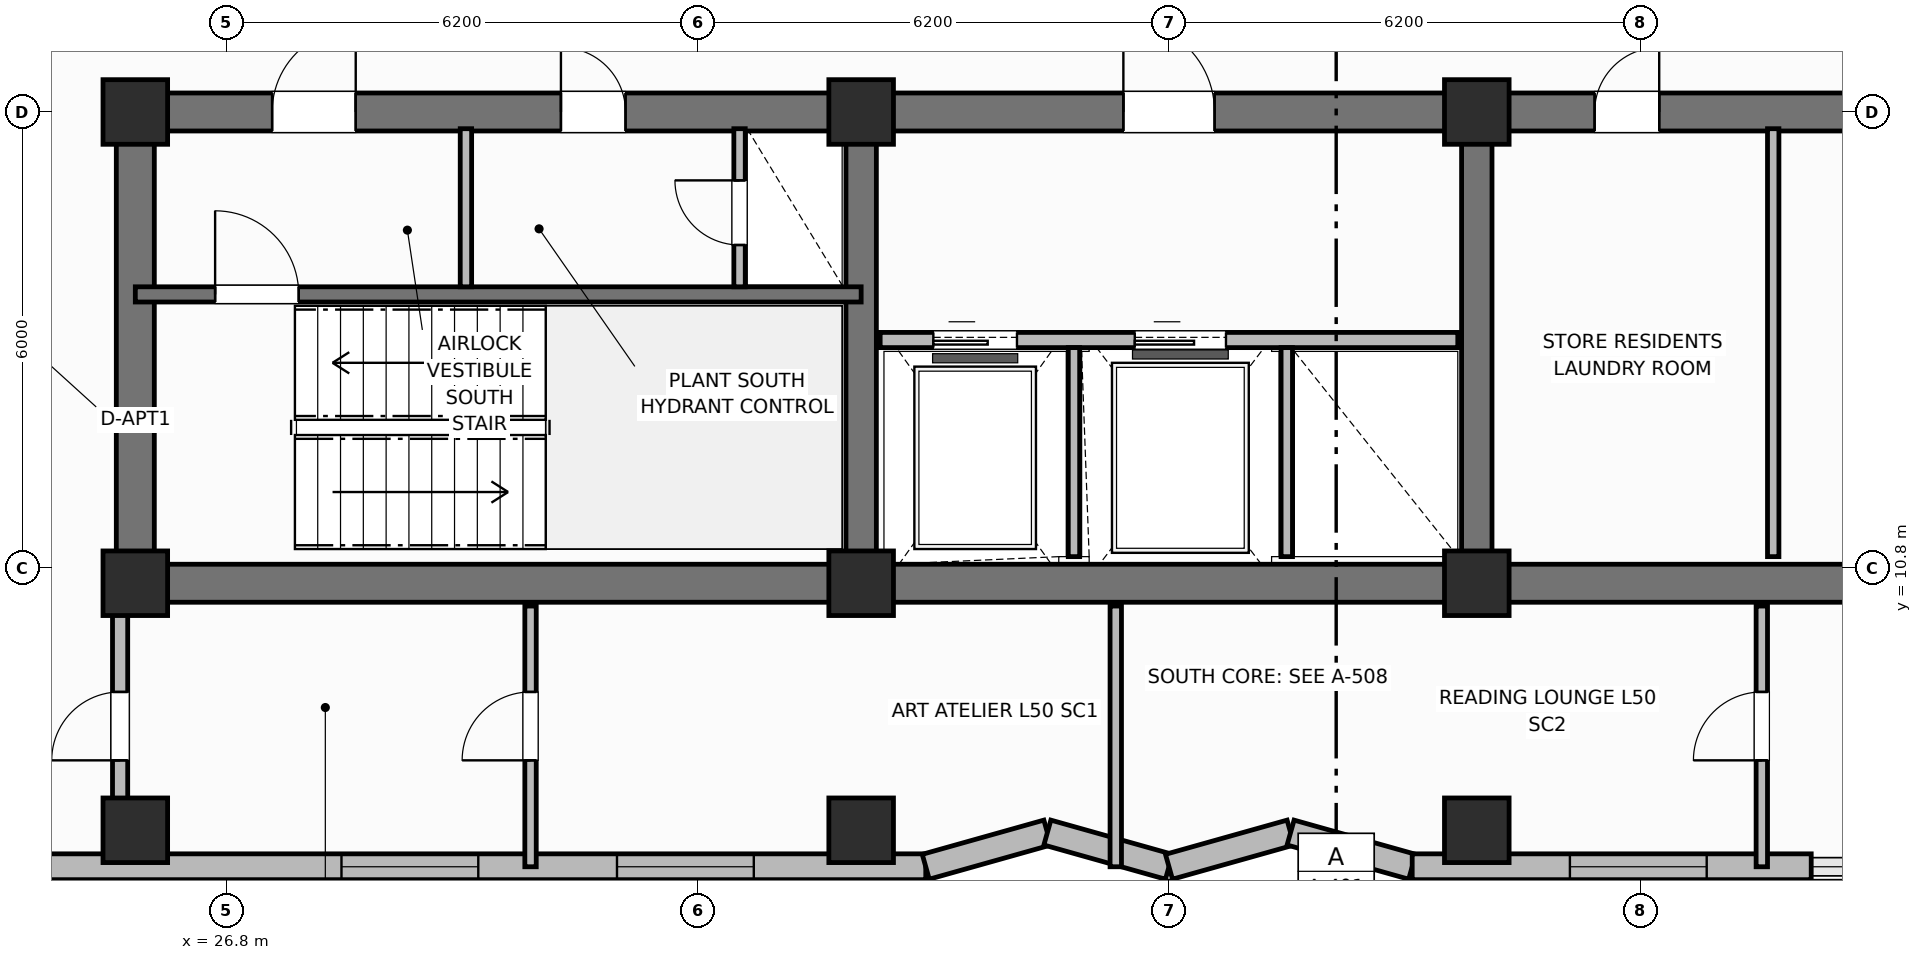
"""IFC4 building model, lengths in metres.
Left out: names, types, materials, properties, quantities, classifications, styles, units other than length and angle.
Written with IfcOpenShell. Run it as: python <this file> out.ifc"""

import sys

from ifc_helpers import new_model, si_unit, direction, frame, frame_2d, origin, origin_2d, place, context, subcontext, project, spatial, rectangle, extrude, element, fill, save


model = new_model("IFC4")
c1 = context("Model", 3, precision=1e-05, world=origin(), true_north=direction((0.0, 1.0)))
c2 = subcontext(c1, "Body", "Model", "MODEL_VIEW")
j1 = project(units=[si_unit("LENGTHUNIT", "METRE"), si_unit("PLANEANGLEUNIT", "RADIAN")], contexts=[c1])
p1 = place(None, origin())
s1 = spatial("IfcSite", under=j1, at=p1, CompositionType="ELEMENT")
p2 = place(p1, origin())
s2 = spatial("IfcBuilding", under=s1, at=p2, CompositionType="ELEMENT")
p3 = place(p2, frame((0.0, 0.0, 203.1)))
s3 = spatial("IfcBuildingStorey", under=s2, at=p3, CompositionType="ELEMENT", Elevation=203.1)
p4 = place(p3, frame((52.8, 10.6, 0.0), z_axis=(0.0, 0.0, 1.0), x_axis=(-1.0, 0.0, 0.0)))
e1 = element("IfcWall", 1, at=p4, inside=s3, PredefinedType="SHEAR", context=c2, shape_type="SweptSolid", body=[
    extrude(rectangle(XDim=27.2, YDim=0.5, at=frame_2d((13.6, 0.0))), origin(), (0.0, 0.0, 1.0), 4.2),
])
p5 = place(p3, frame((25.6, 10.85, 0.0), z_axis=(0.0, 0.0, 1.0), x_axis=(0.0, 1.0, 0.0)))
e2 = element("IfcWall", 2, at=p5, inside=s3, PredefinedType="SHEAR", context=c2, shape_type="SweptSolid", body=[
    extrude(rectangle(XDim=5.7, YDim=0.5, at=frame_2d((2.85, 0.0))), origin(), (0.0, 0.0, 1.0), 4.2),
])
p6 = place(p3, frame((25.6, 16.8, 0.0), z_axis=(0.0, 0.0, 1.0), x_axis=(1.0, 0.0, 0.0)))
e3 = element("IfcWall", 3, at=p6, inside=s3, PredefinedType="SHEAR", context=c2, shape_type="SweptSolid", body=[
    extrude(rectangle(XDim=27.2, YDim=0.5, at=frame_2d((13.6, 0.0))), origin(), (0.0, 0.0, 1.0), 4.2),
])
p7 = place(p6, frame((1.8, 0.0, 0.0)))
e4 = element("IfcOpeningElement", 4, at=p7, cuts=e3, PredefinedType="OPENING", context=c2, shape_type="SweptSolid", body=[
    extrude(rectangle(XDim=1.1, YDim=2.15, at=frame_2d((0.55, 1.075))), frame((0.0, 0.26, 0.0), z_axis=(0.0, -1.0, 0.0), x_axis=(1.0, 0.0, 0.0)), (0.0, 0.0, 1.0), 0.52),
])
p8 = place(p6, frame((5.6, 0.0, 0.0)))
e5 = element("IfcOpeningElement", 5, at=p8, cuts=e3, PredefinedType="OPENING", context=c2, shape_type="SweptSolid", body=[
    extrude(rectangle(XDim=0.85, YDim=2.1, at=frame_2d((0.425, 1.05))), frame((0.0, 0.26, 0.0), z_axis=(0.0, -1.0, 0.0), x_axis=(1.0, 0.0, 0.0)), (0.0, 0.0, 1.0), 0.52),
])
p9 = place(p6, frame((13.0, 0.0, 0.0)))
e6 = element("IfcOpeningElement", 6, at=p9, cuts=e3, PredefinedType="OPENING", context=c2, shape_type="SweptSolid", body=[
    extrude(rectangle(XDim=1.2, YDim=2.15, at=frame_2d((0.6, 1.075))), frame((0.0, 0.26, 0.0), z_axis=(0.0, -1.0, 0.0), x_axis=(1.0, 0.0, 0.0)), (0.0, 0.0, 1.0), 0.52),
])
p10 = place(p6, frame((19.2, 0.0, 0.0)))
e7 = element("IfcOpeningElement", 7, at=p10, cuts=e3, PredefinedType="OPENING", context=c2, shape_type="SweptSolid", body=[
    extrude(rectangle(XDim=0.85, YDim=2.1, at=frame_2d((0.425, 1.05))), frame((0.0, 0.26, 0.0), z_axis=(0.0, -1.0, 0.0), x_axis=(1.0, 0.0, 0.0)), (0.0, 0.0, 1.0), 0.52),
])
p11 = place(p6, frame((23.8, 0.0, 0.0)))
e8 = element("IfcOpeningElement", 8, at=p11, cuts=e3, PredefinedType="OPENING", context=c2, shape_type="SweptSolid", body=[
    extrude(rectangle(XDim=0.9, YDim=2.1, at=frame_2d((0.45, 1.05))), frame((0.0, 0.26, 0.0), z_axis=(0.0, -1.0, 0.0), x_axis=(1.0, 0.0, 0.0)), (0.0, 0.0, 1.0), 0.52),
])
for number, where, z_axis, x_axis in (
    (9, (35.15, 10.85, 0.0), (0.0, 0.0, 1.0), (0.0, 1.0, 0.0)),
    (10, (43.25, 10.85, 0.0), (0.0, 0.0, 1.0), (0.0, 1.0, 0.0)),
):
    element("IfcWall", number, at=place(p3, frame(where, z_axis=z_axis, x_axis=x_axis)), inside=s3, PredefinedType="SHEAR", context=c2, shape_type="SweptSolid", body=[
        extrude(rectangle(XDim=5.7, YDim=0.4, at=frame_2d((2.85, 0.0))), origin(), (0.0, 0.0, 1.0), 4.2),
    ])
for number, where, z_axis, x_axis in (
    (11, (25.6, 10.6, 0.0), (0.0, 0.0, 1.0), (1.0, 0.0, 0.0)),
    (12, (25.6, 16.8, 0.0), (0.0, 0.0, 1.0), (1.0, 0.0, 0.0)),
    (13, (35.15, 10.6, 0.0), (0.0, 0.0, 1.0), (1.0, 0.0, 0.0)),
    (14, (35.15, 16.8, 0.0), (0.0, 0.0, 1.0), (1.0, 0.0, 0.0)),
    (15, (43.25, 10.6, 0.0), (0.0, 0.0, 1.0), (1.0, 0.0, 0.0)),
    (16, (43.25, 16.8, 0.0), (0.0, 0.0, 1.0), (1.0, 0.0, 0.0)),
    (17, (25.6, 7.35, 0.0), (0.0, 0.0, 1.0), (1.0, 0.0, 0.0)),
    (18, (35.15, 7.35, 0.0), (0.0, 0.0, 1.0), (1.0, 0.0, 0.0)),
    (19, (43.25, 7.35, 0.0), (0.0, 0.0, 1.0), (1.0, 0.0, 0.0)),
):
    element("IfcColumn", number, at=place(p3, frame(where, z_axis=z_axis, x_axis=x_axis)), inside=s3, PredefinedType="COLUMN", context=c2, shape_type="SweptSolid", body=[
        extrude(rectangle(XDim=0.85, YDim=0.85, at=origin_2d()), origin(), (0.0, 0.0, 1.0), 4.2),
    ])
p12 = place(p3, frame((20.2, 6.87, 0.0), z_axis=(0.0, 0.0, 1.0), x_axis=(1.0, 0.0, 0.0)))
e20 = element("IfcWall", 20, at=p12, inside=s3, PredefinedType="SOLIDWALL", context=c2, shape_type="SweptSolid", body=[
    extrude(rectangle(XDim=15.8, YDim=0.34, at=frame_2d((7.9, 0.0))), origin(), (0.0, 0.0, 1.0), 3.22),
])
p13 = place(p12, frame((1.212, 0.0, 0.85)))
e21 = element("IfcOpeningElement", 21, at=p13, cuts=e20, PredefinedType="OPENING", context=c2, shape_type="SweptSolid", body=[
    extrude(rectangle(XDim=1.8, YDim=1.85, at=frame_2d((0.9, 0.925))), frame((0.0, 0.18, 0.0), z_axis=(0.0, -1.0, 0.0), x_axis=(1.0, 0.0, 0.0)), (0.0, 0.0, 1.0), 0.36),
])
p14 = place(p12, frame((8.113, 0.0, 0.85)))
e22 = element("IfcOpeningElement", 22, at=p14, cuts=e20, PredefinedType="OPENING", context=c2, shape_type="SweptSolid", body=[
    extrude(rectangle(XDim=1.8, YDim=1.85, at=frame_2d((0.9, 0.925))), frame((0.0, 0.18, 0.0), z_axis=(0.0, -1.0, 0.0), x_axis=(1.0, 0.0, 0.0)), (0.0, 0.0, 1.0), 0.36),
])
p15 = place(p12, frame((11.738, 0.0, 0.85)))
e23 = element("IfcOpeningElement", 23, at=p15, cuts=e20, PredefinedType="OPENING", context=c2, shape_type="SweptSolid", body=[
    extrude(rectangle(XDim=1.8, YDim=1.85, at=frame_2d((0.9, 0.925))), frame((0.0, 0.18, 0.0), z_axis=(0.0, -1.0, 0.0), x_axis=(1.0, 0.0, 0.0)), (0.0, 0.0, 1.0), 0.36),
])
p16 = place(p3, frame((36.0, 6.87, 0.0), z_axis=(0.0, 0.0, 1.0), x_axis=(0.962662902433, 0.270703040766, 0.0)))
e24 = element("IfcWall", 24, at=p16, inside=s3, PredefinedType="SOLIDWALL", context=c2, shape_type="SweptSolid", body=[
    extrude(rectangle(XDim=1.662, YDim=0.34, at=frame_2d((0.831, 0.0))), origin(), (0.0, 0.0, 1.0), 3.22),
])
p17 = place(p3, frame((37.6, 7.32, 0.0), z_axis=(0.0, 0.0, 1.0), x_axis=(0.962652136636, -0.270741322725, 0.0)))
e25 = element("IfcWall", 25, at=p17, inside=s3, PredefinedType="SOLIDWALL", context=c2, shape_type="SweptSolid", body=[
    extrude(rectangle(XDim=1.662, YDim=0.34, at=frame_2d((0.831, 0.0))), origin(), (0.0, 0.0, 1.0), 3.22),
])
p18 = place(p3, frame((39.2, 6.87, 0.0), z_axis=(0.0, 0.0, 1.0), x_axis=(0.962662902433, 0.270703040766, 0.0)))
e26 = element("IfcWall", 26, at=p18, inside=s3, PredefinedType="SOLIDWALL", context=c2, shape_type="SweptSolid", body=[
    extrude(rectangle(XDim=1.662, YDim=0.34, at=frame_2d((0.831, 0.0))), origin(), (0.0, 0.0, 1.0), 3.22),
])
p19 = place(p3, frame((40.8, 7.32, 0.0), z_axis=(0.0, 0.0, 1.0), x_axis=(0.962652136636, -0.270741322725, 0.0)))
e27 = element("IfcWall", 27, at=p19, inside=s3, PredefinedType="SOLIDWALL", context=c2, shape_type="SweptSolid", body=[
    extrude(rectangle(XDim=1.662, YDim=0.34, at=frame_2d((0.831, 0.0))), origin(), (0.0, 0.0, 1.0), 3.22),
])
p20 = place(p3, frame((42.4, 6.87, 0.0), z_axis=(0.0, 0.0, 1.0), x_axis=(1.0, 0.0, 0.0)))
e28 = element("IfcWall", 28, at=p20, inside=s3, PredefinedType="SOLIDWALL", context=c2, shape_type="SweptSolid", body=[
    extrude(rectangle(XDim=5.25, YDim=0.34, at=frame_2d((2.625, 0.0))), origin(), (0.0, 0.0, 1.0), 3.22),
])
p21 = place(p20, frame((2.075, 0.0, 0.85)))
e29 = element("IfcOpeningElement", 29, at=p21, cuts=e28, PredefinedType="OPENING", context=c2, shape_type="SweptSolid", body=[
    extrude(rectangle(XDim=1.8, YDim=1.85, at=frame_2d((0.9, 0.925))), frame((0.0, 0.18, 0.0), z_axis=(0.0, -1.0, 0.0), x_axis=(1.0, 0.0, 0.0)), (0.0, 0.0, 1.0), 0.36),
])
p22 = place(p3, frame((25.6, 14.4, 0.0), z_axis=(0.0, 0.0, 1.0), x_axis=(1.0, 0.0, 0.0)))
e30 = element("IfcWall", 30, at=p22, inside=s3, PredefinedType="SHEAR", context=c2, shape_type="SweptSolid", body=[
    extrude(rectangle(XDim=9.55, YDim=0.2, at=frame_2d((4.775, 0.0))), origin(), (0.0, 0.0, 1.0), 4.2),
])
p23 = place(p22, frame((1.05, 0.0, 0.0)))
e31 = element("IfcOpeningElement", 31, at=p23, cuts=e30, PredefinedType="OPENING", context=c2, shape_type="SweptSolid", body=[
    extrude(rectangle(XDim=1.1, YDim=2.15, at=frame_2d((0.55, 1.075))), frame((0.0, 0.11, 0.0), z_axis=(0.0, -1.0, 0.0), x_axis=(1.0, 0.0, 0.0)), (0.0, 0.0, 1.0), 0.22),
])
p24 = place(p3, frame((29.95, 14.5, 0.0), z_axis=(0.0, 0.0, 1.0), x_axis=(0.0, 1.0, 0.0)))
e32 = element("IfcWall", 32, at=p24, inside=s3, PredefinedType="PARTITIONING", context=c2, shape_type="SweptSolid", body=[
    extrude(rectangle(XDim=2.08, YDim=0.15, at=frame_2d((1.04, 0.0))), origin(), (0.0, 0.0, 1.0), 3.05),
])
p25 = place(p3, frame((33.55, 14.5, 0.0), z_axis=(0.0, 0.0, 1.0), x_axis=(0.0, 1.0, 0.0)))
e33 = element("IfcWall", 33, at=p25, inside=s3, PredefinedType="PARTITIONING", context=c2, shape_type="SweptSolid", body=[
    extrude(rectangle(XDim=2.08, YDim=0.15, at=frame_2d((1.04, 0.0))), origin(), (0.0, 0.0, 1.0), 3.05),
])
p26 = place(p25, frame((0.55, 0.0, 0.0)))
e34 = element("IfcOpeningElement", 34, at=p26, cuts=e33, PredefinedType="OPENING", context=c2, shape_type="SweptSolid", body=[
    extrude(rectangle(XDim=0.85, YDim=2.05, at=frame_2d((0.425, 1.025))), frame((0.0, 0.085, 0.0), z_axis=(0.0, -1.0, 0.0), x_axis=(1.0, 0.0, 0.0)), (0.0, 0.0, 1.0), 0.17),
])
p27 = place(p3, frame((35.4, 13.8, 0.0), z_axis=(0.0, 0.0, 1.0), x_axis=(1.0, 0.0, 0.0)))
e35 = element("IfcWall", 35, at=p27, inside=s3, PredefinedType="PARTITIONING", context=c2, shape_type="SweptSolid", body=[
    extrude(rectangle(XDim=7.6, YDim=0.2, at=frame_2d((3.8, 0.0))), origin(), (0.0, 0.0, 1.0), 2.82),
])
p28 = place(p27, frame((0.7, 0.0, 0.0)))
e36 = element("IfcOpeningElement", 36, at=p28, cuts=e35, PredefinedType="OPENING", context=c2, shape_type="SweptSolid", body=[
    extrude(rectangle(XDim=1.1, YDim=2.15, at=frame_2d((0.55, 1.075))), frame((0.0, 0.11, 0.0), z_axis=(0.0, -1.0, 0.0), x_axis=(1.0, 0.0, 0.0)), (0.0, 0.0, 1.0), 0.22),
])
p29 = place(p27, frame((3.35, 0.0, 0.0)))
e37 = element("IfcOpeningElement", 37, at=p29, cuts=e35, PredefinedType="OPENING", context=c2, shape_type="SweptSolid", body=[
    extrude(rectangle(XDim=1.2, YDim=2.15, at=frame_2d((0.6, 1.075))), frame((0.0, 0.11, 0.0), z_axis=(0.0, -1.0, 0.0), x_axis=(1.0, 0.0, 0.0)), (0.0, 0.0, 1.0), 0.22),
])
for number, where, z_axis, x_axis in (
    (38, (37.95, 10.95, 0.0), (0.0, 0.0, 1.0), (0.0, 1.0, 0.0)),
    (39, (40.75, 10.95, 0.0), (0.0, 0.0, 1.0), (0.0, 1.0, 0.0)),
):
    element("IfcWall", number, at=place(p3, frame(where, z_axis=z_axis, x_axis=x_axis)), inside=s3, PredefinedType="PARTITIONING", context=c2, shape_type="SweptSolid", body=[
        extrude(rectangle(XDim=2.75, YDim=0.15, at=frame_2d((1.375, 0.0))), origin(), (0.0, 0.0, 1.0), 3.05),
    ])
p30 = place(p3, frame((47.15, 10.95, 0.0), z_axis=(0.0, 0.0, 1.0), x_axis=(0.0, 1.0, 0.0)))
e40 = element("IfcWall", 40, at=p30, inside=s3, PredefinedType="PARTITIONING", context=c2, shape_type="SweptSolid", body=[
    extrude(rectangle(XDim=5.63, YDim=0.15, at=frame_2d((2.815, 0.0))), origin(), (0.0, 0.0, 1.0), 3.05),
])
p31 = place(p3, frame((30.8, 6.87, 0.0), z_axis=(0.0, 0.0, 1.0), x_axis=(0.0, 1.0, 0.0)))
e41 = element("IfcWall", 41, at=p31, inside=s3, PredefinedType="PARTITIONING", context=c2, shape_type="SweptSolid", body=[
    extrude(rectangle(XDim=3.43, YDim=0.15, at=frame_2d((1.715, 0.0))), origin(), (0.0, 0.0, 1.0), 3.05),
])
p32 = place(p31, frame((1.4, 0.0, 0.0)))
e42 = element("IfcOpeningElement", 42, at=p32, cuts=e41, PredefinedType="OPENING", context=c2, shape_type="SweptSolid", body=[
    extrude(rectangle(XDim=0.9, YDim=2.1, at=frame_2d((0.45, 1.05))), frame((0.0, 0.085, 0.0), z_axis=(0.0, -1.0, 0.0), x_axis=(1.0, 0.0, 0.0)), (0.0, 0.0, 1.0), 0.17),
])
p33 = place(p3, frame((38.5, 6.87, 0.0), z_axis=(0.0, 0.0, 1.0), x_axis=(0.0, 1.0, 0.0)))
e43 = element("IfcWall", 43, at=p33, inside=s3, PredefinedType="PARTITIONING", context=c2, shape_type="SweptSolid", body=[
    extrude(rectangle(XDim=3.43, YDim=0.15, at=frame_2d((1.715, 0.0))), origin(), (0.0, 0.0, 1.0), 3.05),
])
p34 = place(p3, frame((47.0, 6.87, 0.0), z_axis=(0.0, 0.0, 1.0), x_axis=(0.0, 1.0, 0.0)))
e44 = element("IfcWall", 44, at=p34, inside=s3, PredefinedType="PARTITIONING", context=c2, shape_type="SweptSolid", body=[
    extrude(rectangle(XDim=3.43, YDim=0.15, at=frame_2d((1.715, 0.0))), origin(), (0.0, 0.0, 1.0), 3.05),
])
p35 = place(p34, frame((1.4, 0.0, 0.0)))
e45 = element("IfcOpeningElement", 45, at=p35, cuts=e44, PredefinedType="OPENING", context=c2, shape_type="SweptSolid", body=[
    extrude(rectangle(XDim=0.9, YDim=2.1, at=frame_2d((0.45, 1.05))), frame((0.0, 0.085, 0.0), z_axis=(0.0, -1.0, 0.0), x_axis=(1.0, 0.0, 0.0)), (0.0, 0.0, 1.0), 0.17),
])
p36 = place(p3, frame((25.4, 7.62, 0.0), z_axis=(0.0, 0.0, 1.0), x_axis=(0.0, 1.0, 0.0)))
e46 = element("IfcWall", 46, at=p36, inside=s3, PredefinedType="PARTITIONING", context=c2, shape_type="SweptSolid", body=[
    extrude(rectangle(XDim=2.68, YDim=0.2, at=frame_2d((1.34, 0.0))), origin(), (0.0, 0.0, 1.0), 3.05),
])
p37 = place(p36, frame((0.65, 0.0, 0.0)))
e47 = element("IfcOpeningElement", 47, at=p37, cuts=e46, PredefinedType="OPENING", context=c2, shape_type="SweptSolid", body=[
    extrude(rectangle(XDim=0.9, YDim=2.1, at=frame_2d((0.45, 1.05))), frame((0.0, 0.11, 0.0), z_axis=(0.0, -1.0, 0.0), x_axis=(1.0, 0.0, 0.0)), (0.0, 0.0, 1.0), 0.22),
])
p38 = place(p14, origin())
e48 = element("IfcWindow", 48, at=p38, inside=s3, PartitioningType="SINGLE_PANEL", PredefinedType="WINDOW", context=c2, shape_type="SweptSolid", body=[
    extrude(rectangle(XDim=1.8, YDim=1.85, at=frame_2d((0.9, 0.925))), frame((0.0, 0.03, 0.0), z_axis=(0.0, -1.0, 0.0), x_axis=(1.0, 0.0, 0.0)), (0.0, 0.0, 1.0), 0.06),
])
fill(e22, e48)
p39 = place(p15, origin())
e49 = element("IfcWindow", 49, at=p39, inside=s3, PartitioningType="SINGLE_PANEL", PredefinedType="WINDOW", context=c2, shape_type="SweptSolid", body=[
    extrude(rectangle(XDim=1.8, YDim=1.85, at=frame_2d((0.9, 0.925))), frame((0.0, 0.03, 0.0), z_axis=(0.0, -1.0, 0.0), x_axis=(1.0, 0.0, 0.0)), (0.0, 0.0, 1.0), 0.06),
])
fill(e23, e49)
p40 = place(p21, origin())
e50 = element("IfcWindow", 50, at=p40, inside=s3, PartitioningType="SINGLE_PANEL", PredefinedType="WINDOW", context=c2, shape_type="SweptSolid", body=[
    extrude(rectangle(XDim=1.8, YDim=1.85, at=frame_2d((0.9, 0.925))), frame((0.0, 0.03, 0.0), z_axis=(0.0, -1.0, 0.0), x_axis=(1.0, 0.0, 0.0)), (0.0, 0.0, 1.0), 0.06),
])
fill(e29, e50)
p41 = place(p23, origin())
e51 = element("IfcDoor", 51, at=p41, inside=s3, OperationType="SINGLE_SWING_LEFT", PredefinedType="DOOR", context=c2, shape_type="SweptSolid", body=[
    extrude(rectangle(XDim=1.1, YDim=2.15, at=frame_2d((0.55, 1.075))), frame((0.0, 0.025, 0.0), z_axis=(0.0, -1.0, 0.0), x_axis=(1.0, 0.0, 0.0)), (0.0, 0.0, 1.0), 0.05),
])
fill(e31, e51)
p42 = place(p26, origin())
e52 = element("IfcDoor", 52, at=p42, inside=s3, OperationType="SINGLE_SWING_RIGHT", PredefinedType="TRAPDOOR", context=c2, shape_type="SweptSolid", body=[
    extrude(rectangle(XDim=0.85, YDim=2.05, at=frame_2d((0.425, 1.025))), frame((0.0, 0.025, 0.0), z_axis=(0.0, -1.0, 0.0), x_axis=(1.0, 0.0, 0.0)), (0.0, 0.0, 1.0), 0.05),
])
fill(e34, e52)
p43 = place(p28, origin())
e53 = element("IfcDoor", 53, at=p43, inside=s3, OperationType="SLIDING_TO_LEFT", PredefinedType="DOOR", context=c2, shape_type="SweptSolid", body=[
    extrude(rectangle(XDim=1.1, YDim=2.15, at=frame_2d((0.55, 1.075))), frame((0.0, 0.025, 0.0), z_axis=(0.0, -1.0, 0.0), x_axis=(1.0, 0.0, 0.0)), (0.0, 0.0, 1.0), 0.05),
])
fill(e36, e53)
p44 = place(p29, origin())
e54 = element("IfcDoor", 54, at=p44, inside=s3, OperationType="SLIDING_TO_LEFT", PredefinedType="DOOR", context=c2, shape_type="SweptSolid", body=[
    extrude(rectangle(XDim=1.2, YDim=2.15, at=frame_2d((0.6, 1.075))), frame((0.0, 0.025, 0.0), z_axis=(0.0, -1.0, 0.0), x_axis=(1.0, 0.0, 0.0)), (0.0, 0.0, 1.0), 0.05),
])
fill(e37, e54)
p45 = place(p32, origin())
e55 = element("IfcDoor", 55, at=p45, inside=s3, OperationType="SINGLE_SWING_LEFT", PredefinedType="DOOR", context=c2, shape_type="SweptSolid", body=[
    extrude(rectangle(XDim=0.9, YDim=2.1, at=frame_2d((0.45, 1.05))), frame((0.0, 0.025, 0.0), z_axis=(0.0, -1.0, 0.0), x_axis=(1.0, 0.0, 0.0)), (0.0, 0.0, 1.0), 0.05),
])
fill(e42, e55)
p46 = place(p35, origin())
e56 = element("IfcDoor", 56, at=p46, inside=s3, OperationType="SINGLE_SWING_LEFT", PredefinedType="DOOR", context=c2, shape_type="SweptSolid", body=[
    extrude(rectangle(XDim=0.9, YDim=2.1, at=frame_2d((0.45, 1.05))), frame((0.0, 0.025, 0.0), z_axis=(0.0, -1.0, 0.0), x_axis=(1.0, 0.0, 0.0)), (0.0, 0.0, 1.0), 0.05),
])
fill(e45, e56)
p47 = place(p37, origin())
e57 = element("IfcDoor", 57, at=p47, inside=s3, OperationType="SINGLE_SWING_LEFT", PredefinedType="DOOR", context=c2, shape_type="SweptSolid", body=[
    extrude(rectangle(XDim=0.9, YDim=2.1, at=frame_2d((0.45, 1.05))), frame((0.0, 0.025, 0.0), z_axis=(0.0, -1.0, 0.0), x_axis=(1.0, 0.0, 0.0)), (0.0, 0.0, 1.0), 0.05),
])
fill(e47, e57)
p48 = place(p7, origin())
e58 = element("IfcDoor", 58, at=p48, inside=s3, OperationType="SINGLE_SWING_RIGHT", PredefinedType="DOOR", context=c2, shape_type="SweptSolid", body=[
    extrude(rectangle(XDim=1.1, YDim=2.15, at=frame_2d((0.55, 1.075))), frame((0.0, 0.025, 0.0), z_axis=(0.0, -1.0, 0.0), x_axis=(1.0, 0.0, 0.0)), (0.0, 0.0, 1.0), 0.05),
])
fill(e4, e58)
p49 = place(p8, origin())
e59 = element("IfcDoor", 59, at=p49, inside=s3, OperationType="SINGLE_SWING_LEFT", PredefinedType="DOOR", context=c2, shape_type="SweptSolid", body=[
    extrude(rectangle(XDim=0.85, YDim=2.1, at=frame_2d((0.425, 1.05))), frame((0.0, 0.025, 0.0), z_axis=(0.0, -1.0, 0.0), x_axis=(1.0, 0.0, 0.0)), (0.0, 0.0, 1.0), 0.05),
])
fill(e5, e59)
p50 = place(p9, origin())
e60 = element("IfcDoor", 60, at=p50, inside=s3, OperationType="SINGLE_SWING_LEFT", PredefinedType="DOOR", context=c2, shape_type="SweptSolid", body=[
    extrude(rectangle(XDim=1.2, YDim=2.15, at=frame_2d((0.6, 1.075))), frame((0.0, 0.025, 0.0), z_axis=(0.0, -1.0, 0.0), x_axis=(1.0, 0.0, 0.0)), (0.0, 0.0, 1.0), 0.05),
])
fill(e6, e60)
p51 = place(p10, origin())
e61 = element("IfcDoor", 61, at=p51, inside=s3, OperationType="SINGLE_SWING_RIGHT", PredefinedType="DOOR", context=c2, shape_type="SweptSolid", body=[
    extrude(rectangle(XDim=0.85, YDim=2.1, at=frame_2d((0.425, 1.05))), frame((0.0, 0.025, 0.0), z_axis=(0.0, -1.0, 0.0), x_axis=(1.0, 0.0, 0.0)), (0.0, 0.0, 1.0), 0.05),
])
fill(e7, e61)
save(model, sys.argv[1])
